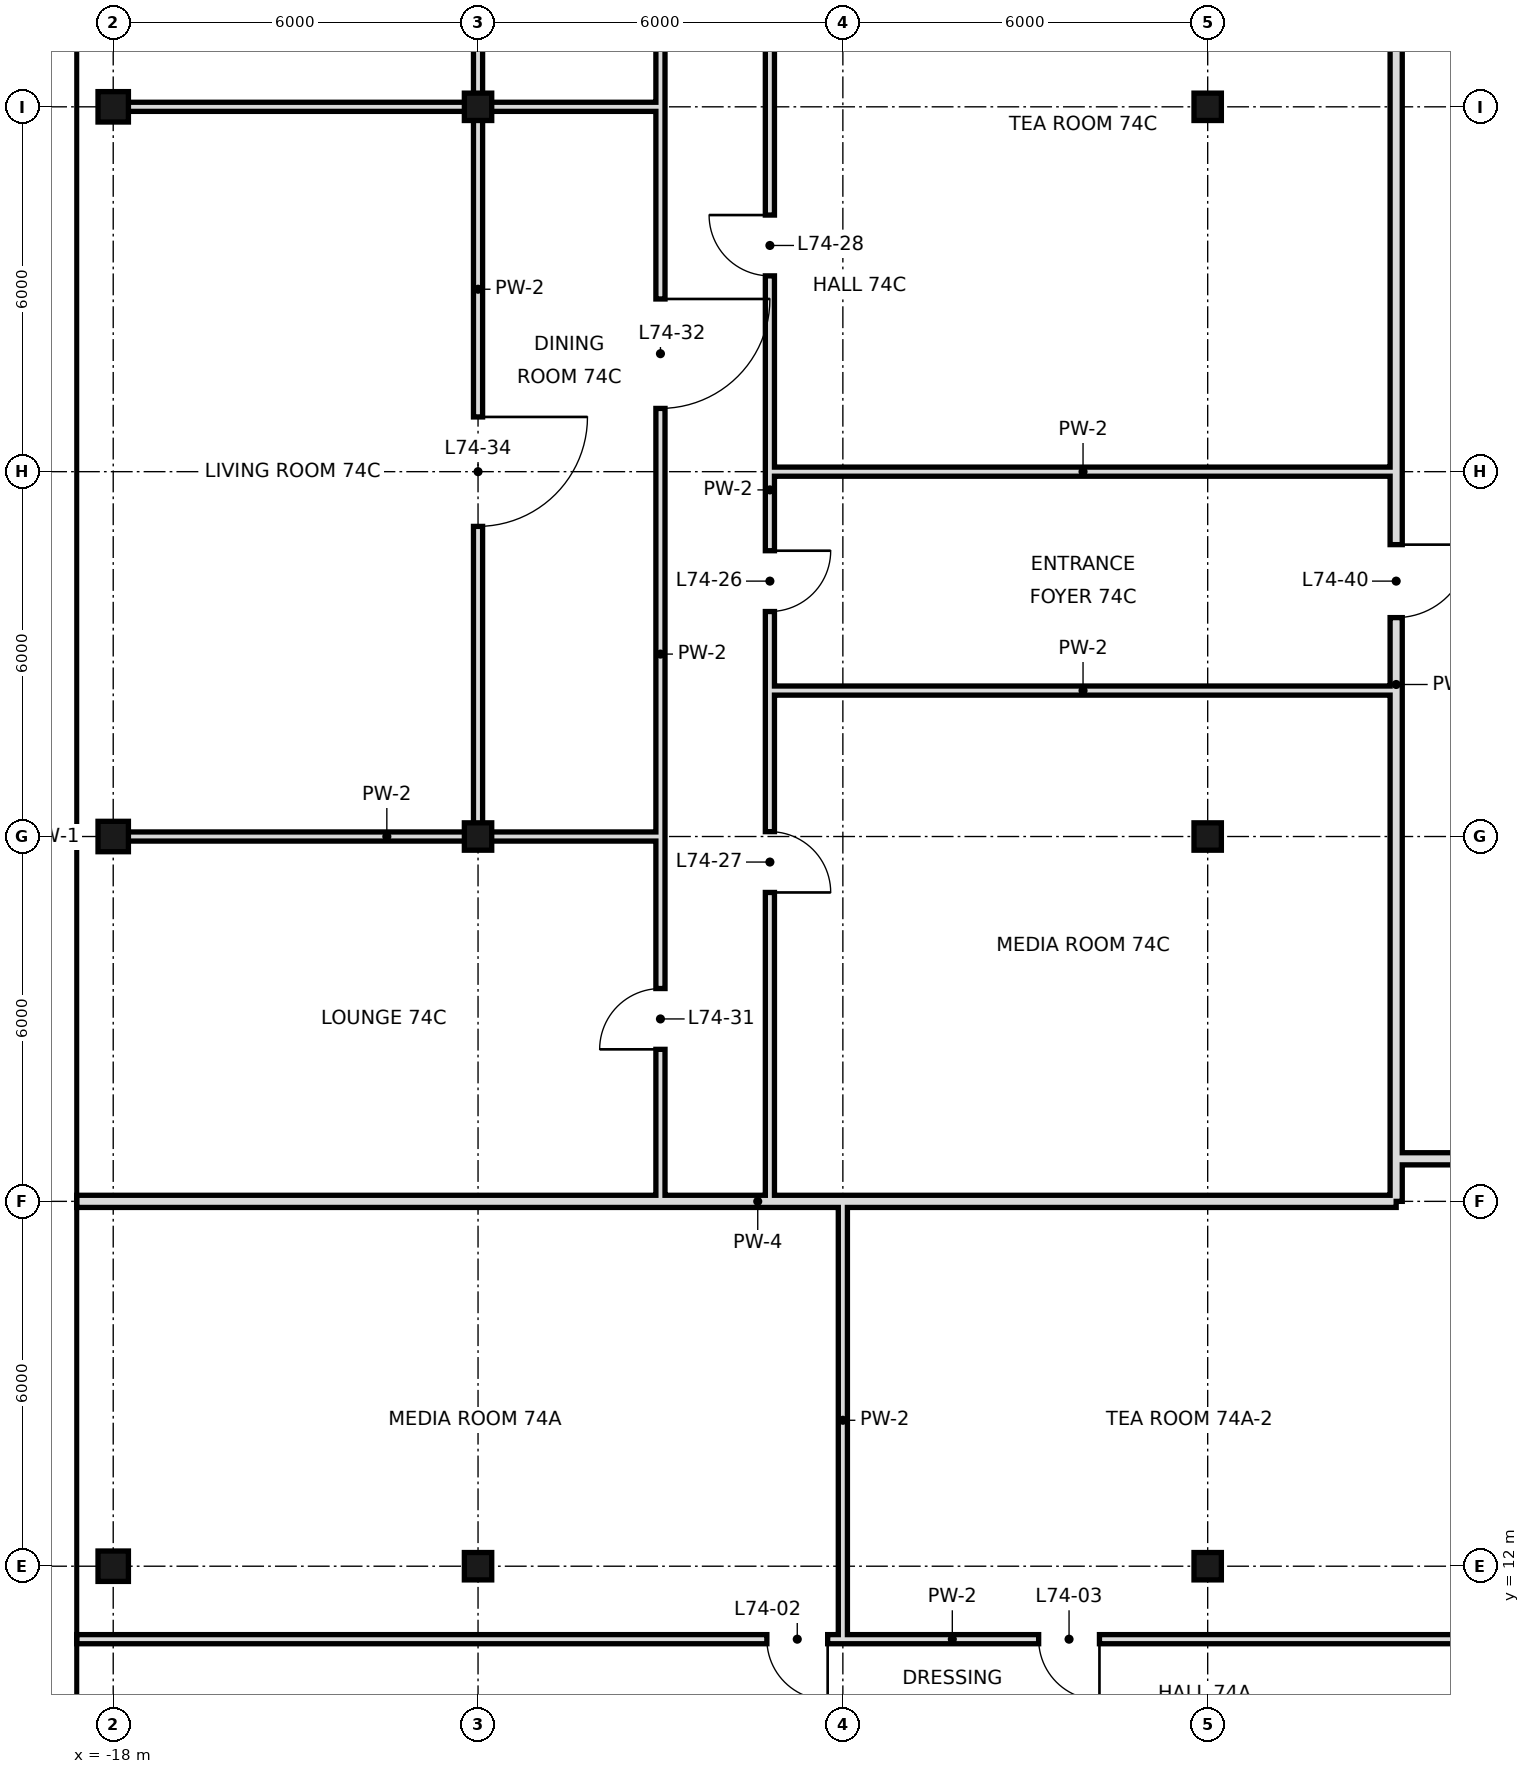
"""IFC4 building model, lengths in metres.
Left out: names, types, materials, properties, quantities, classifications, styles, units other than length and angle.
Written with IfcOpenShell. Run it as: python <this file> out.ifc"""

import sys

from ifc_helpers import new_model, si_unit, direction, frame, frame_2d, origin, origin_2d, place, context, subcontext, project, spatial, rectangle, hollow_rectangle, extrude, element, fill, save


model = new_model("IFC4")
c1 = context("Model", 3, precision=1e-05, world=origin(), true_north=direction((0.0, 1.0)))
c2 = subcontext(c1, "Body", "Model", "MODEL_VIEW")
j1 = project(units=[si_unit("LENGTHUNIT", "METRE"), si_unit("PLANEANGLEUNIT", "RADIAN")], contexts=[c1])
p1 = place(None, origin())
s1 = spatial("IfcSite", under=j1, at=p1, CompositionType="ELEMENT")
p2 = place(p1, origin())
s2 = spatial("IfcBuilding", under=s1, at=p2, CompositionType="ELEMENT")
p3 = place(p2, frame((0.0, 0.0, 312.4)))
s3 = spatial("IfcBuildingStorey", under=s2, at=p3, CompositionType="ELEMENT", Elevation=312.4)
for number, where, z_axis, x_axis in (
    (1, (-18.0, 12.0, 0.0), (0.0, 0.0, 1.0), (1.0, 0.0, 0.0)),
    (2, (-18.0, 24.0, 0.0), (0.0, 0.0, 1.0), (1.0, 0.0, 0.0)),
    (3, (-18.0, 36.0, 0.0), (0.0, 0.0, 1.0), (1.0, 0.0, 0.0)),
):
    element("IfcColumn", number, at=place(p3, frame(where, z_axis=z_axis, x_axis=x_axis)), inside=s3, PredefinedType="COLUMN", context=c2, shape_type="SweptSolid", body=[
        extrude(hollow_rectangle(XDim=0.5, YDim=0.5, WallThickness=0.025, at=origin_2d()), origin(), (0.0, 0.0, 1.0), 3.6),
    ])
for number, where, z_axis, x_axis in (
    (4, (-12.0, 12.0, 0.0), (0.0, 0.0, 1.0), (1.0, 0.0, 0.0)),
    (5, (-12.0, 24.0, 0.0), (0.0, 0.0, 1.0), (1.0, 0.0, 0.0)),
    (6, (-12.0, 36.0, 0.0), (0.0, 0.0, 1.0), (1.0, 0.0, 0.0)),
    (7, (0.0, 12.0, 0.0), (0.0, 0.0, 1.0), (1.0, 0.0, 0.0)),
    (8, (0.0, 24.0, 0.0), (0.0, 0.0, 1.0), (1.0, 0.0, 0.0)),
    (9, (0.0, 36.0, 0.0), (0.0, 0.0, 1.0), (1.0, 0.0, 0.0)),
):
    element("IfcColumn", number, at=place(p3, frame(where, z_axis=z_axis, x_axis=x_axis)), inside=s3, PredefinedType="COLUMN", context=c2, shape_type="SweptSolid", body=[
        extrude(hollow_rectangle(XDim=0.45, YDim=0.45, WallThickness=0.022, at=origin_2d()), origin(), (0.0, 0.0, 1.0), 3.6),
    ])
p4 = place(p3, frame((-12.0, 24.0, 0.0), z_axis=(0.0, 0.0, 1.0), x_axis=(0.0, 1.0, 0.0)))
e10 = element("IfcWall", 10, at=p4, inside=s3, PredefinedType="PARTITIONING", context=c2, shape_type="SweptSolid", body=[
    extrude(rectangle(XDim=12.0, YDim=0.15, at=frame_2d((6.0, 0.0))), origin(), (0.0, 0.0, 1.0), 2.72),
])
p5 = place(p4, frame((5.1, 0.0, 0.0)))
e11 = element("IfcOpeningElement", 11, at=p5, cuts=e10, PredefinedType="OPENING", context=c2, shape_type="SweptSolid", body=[
    extrude(rectangle(XDim=1.8, YDim=2.4, at=frame_2d((0.9, 1.2))), frame((0.0, 0.085, 0.0), z_axis=(0.0, -1.0, 0.0), x_axis=(1.0, 0.0, 0.0)), (0.0, 0.0, 1.0), 0.17),
])
p6 = place(p3, frame((-12.0, 36.0, 0.0), z_axis=(0.0, 0.0, 1.0), x_axis=(0.0, 1.0, 0.0)))
e12 = element("IfcWall", 12, at=p6, inside=s3, PredefinedType="PARTITIONING", context=c2, shape_type="SweptSolid", body=[
    extrude(rectangle(XDim=8.4, YDim=0.15, at=frame_2d((4.2, 0.0))), origin(), (0.0, 0.0, 1.0), 2.72),
])
p7 = place(p6, frame((6.75, 0.0, 0.0)))
e13 = element("IfcOpeningElement", 13, at=p7, cuts=e12, PredefinedType="OPENING", context=c2, shape_type="SweptSolid", body=[
    extrude(rectangle(XDim=0.9, YDim=2.4, at=frame_2d((0.45, 1.2))), frame((0.0, 0.085, 0.0), z_axis=(0.0, -1.0, 0.0), x_axis=(1.0, 0.0, 0.0)), (0.0, 0.0, 1.0), 0.17),
])
p8 = place(p3, frame((-6.0, 10.8, 0.0), z_axis=(0.0, 0.0, 1.0), x_axis=(0.0, 1.0, 0.0)))
e14 = element("IfcWall", 14, at=p8, inside=s3, PredefinedType="PARTITIONING", context=c2, shape_type="SweptSolid", body=[
    extrude(rectangle(XDim=7.2, YDim=0.15, at=frame_2d((3.6, 0.0))), origin(), (0.0, 0.0, 1.0), 3.42),
])
p9 = place(p3, frame((-7.2, 18.0, 0.0), z_axis=(0.0, 0.0, 1.0), x_axis=(0.0, 1.0, 0.0)))
e15 = element("IfcWall", 15, at=p9, inside=s3, PredefinedType="PARTITIONING", context=c2, shape_type="SweptSolid", body=[
    extrude(rectangle(XDim=23.4, YDim=0.15, at=frame_2d((11.7, 0.0))), origin(), (0.0, 0.0, 1.0), 3.42),
])
p10 = place(p9, frame((9.7, 0.0, 0.0)))
e16 = element("IfcOpeningElement", 16, at=p10, cuts=e15, PredefinedType="OPENING", context=c2, shape_type="SweptSolid", body=[
    extrude(rectangle(XDim=1.0, YDim=2.4, at=frame_2d((0.5, 1.2))), frame((0.0, 0.085, 0.0), z_axis=(0.0, -1.0, 0.0), x_axis=(1.0, 0.0, 0.0)), (0.0, 0.0, 1.0), 0.17),
])
p11 = place(p9, frame((5.08, 0.0, 0.0)))
e17 = element("IfcOpeningElement", 17, at=p11, cuts=e15, PredefinedType="OPENING", context=c2, shape_type="SweptSolid", body=[
    extrude(rectangle(XDim=1.0, YDim=2.4, at=frame_2d((0.5, 1.2))), frame((0.0, 0.085, 0.0), z_axis=(0.0, -1.0, 0.0), x_axis=(1.0, 0.0, 0.0)), (0.0, 0.0, 1.0), 0.17),
])
p12 = place(p9, frame((15.22, 0.0, 0.0)))
e18 = element("IfcOpeningElement", 18, at=p12, cuts=e15, PredefinedType="OPENING", context=c2, shape_type="SweptSolid", body=[
    extrude(rectangle(XDim=1.0, YDim=2.4, at=frame_2d((0.5, 1.2))), frame((0.0, 0.085, 0.0), z_axis=(0.0, -1.0, 0.0), x_axis=(1.0, 0.0, 0.0)), (0.0, 0.0, 1.0), 0.17),
])
p13 = place(p3, frame((-9.0, 18.0, 0.0), z_axis=(0.0, 0.0, 1.0), x_axis=(0.0, 1.0, 0.0)))
e19 = element("IfcWall", 19, at=p13, inside=s3, PredefinedType="PARTITIONING", context=c2, shape_type="SweptSolid", body=[
    extrude(rectangle(XDim=18.0, YDim=0.15, at=frame_2d((9.0, 0.0))), origin(), (0.0, 0.0, 1.0), 3.42),
])
p14 = place(p13, frame((2.5, 0.0, 0.0)))
e20 = element("IfcOpeningElement", 20, at=p14, cuts=e19, PredefinedType="OPENING", context=c2, shape_type="SweptSolid", body=[
    extrude(rectangle(XDim=1.0, YDim=2.4, at=frame_2d((0.5, 1.2))), frame((0.0, 0.085, 0.0), z_axis=(0.0, -1.0, 0.0), x_axis=(1.0, 0.0, 0.0)), (0.0, 0.0, 1.0), 0.17),
])
p15 = place(p13, frame((13.04, 0.0, 0.0)))
e21 = element("IfcOpeningElement", 21, at=p15, cuts=e19, PredefinedType="OPENING", context=c2, shape_type="SweptSolid", body=[
    extrude(rectangle(XDim=1.8, YDim=2.4, at=frame_2d((0.9, 1.2))), frame((0.0, 0.085, 0.0), z_axis=(0.0, -1.0, 0.0), x_axis=(1.0, 0.0, 0.0)), (0.0, 0.0, 1.0), 0.17),
])
p16 = place(p3, frame((-9.0, 36.0, 0.0), z_axis=(0.0, 0.0, 1.0), x_axis=(0.0, 1.0, 0.0)))
e22 = element("IfcWall", 22, at=p16, inside=s3, PredefinedType="PARTITIONING", context=c2, shape_type="SweptSolid", body=[
    extrude(rectangle(XDim=8.4, YDim=0.15, at=frame_2d((4.2, 0.0))), origin(), (0.0, 0.0, 1.0), 3.42),
])
p17 = place(p3, frame((3.1, 18.7, 0.0), z_axis=(0.0, 0.0, 1.0), x_axis=(0.0, 1.0, 0.0)))
e23 = element("IfcWall", 23, at=p17, inside=s3, PredefinedType="SOLIDWALL", context=c2, shape_type="SweptSolid", body=[
    extrude(rectangle(XDim=22.7, YDim=0.2, at=frame_2d((11.35, 0.0))), origin(), (0.0, 0.0, 1.0), 2.97),
])
p18 = place(p17, frame((8.9, 0.0, 0.0)))
e24 = element("IfcOpeningElement", 24, at=p18, cuts=e23, PredefinedType="OPENING", context=c2, shape_type="SweptSolid", body=[
    extrude(rectangle(XDim=1.2, YDim=2.4, at=frame_2d((0.6, 1.2))), frame((0.0, 0.11, 0.0), z_axis=(0.0, -1.0, 0.0), x_axis=(1.0, 0.0, 0.0)), (0.0, 0.0, 1.0), 0.22),
])
p19 = place(p3, frame((3.1, 18.0, 0.0), z_axis=(0.0, 0.0, 1.0), x_axis=(0.0, 1.0, 0.0)))
e25 = element("IfcWall", 25, at=p19, inside=s3, PredefinedType="SOLIDWALL", context=c2, shape_type="SweptSolid", body=[
    extrude(rectangle(XDim=0.7, YDim=0.2, at=frame_2d((0.35, 0.0))), origin(), (0.0, 0.0, 1.0), 2.97),
])
p20 = place(p3, frame((-18.6, 10.8, 0.0), z_axis=(0.0, 0.0, 1.0), x_axis=(1.0, 0.0, 0.0)))
e26 = element("IfcWall", 26, at=p20, inside=s3, PredefinedType="PARTITIONING", context=c2, shape_type="SweptSolid", body=[
    extrude(rectangle(XDim=28.8, YDim=0.15, at=frame_2d((14.4, 0.0))), origin(), (0.0, 0.0, 1.0), 3.42),
])
p21 = place(p20, frame((25.9, 0.0, 0.0)))
e27 = element("IfcOpeningElement", 27, at=p21, cuts=e26, PredefinedType="OPENING", context=c2, shape_type="SweptSolid", body=[
    extrude(rectangle(XDim=1.0, YDim=2.4, at=frame_2d((0.5, 1.2))), frame((0.0, 0.085, 0.0), z_axis=(0.0, -1.0, 0.0), x_axis=(1.0, 0.0, 0.0)), (0.0, 0.0, 1.0), 0.17),
])
p22 = place(p20, frame((11.35, 0.0, 0.0)))
e28 = element("IfcOpeningElement", 28, at=p22, cuts=e26, PredefinedType="OPENING", context=c2, shape_type="SweptSolid", body=[
    extrude(rectangle(XDim=1.0, YDim=2.4, at=frame_2d((0.5, 1.2))), frame((0.0, 0.085, 0.0), z_axis=(0.0, -1.0, 0.0), x_axis=(1.0, 0.0, 0.0)), (0.0, 0.0, 1.0), 0.17),
])
p23 = place(p20, frame((15.82, 0.0, 0.0)))
e29 = element("IfcOpeningElement", 29, at=p23, cuts=e26, PredefinedType="OPENING", context=c2, shape_type="SweptSolid", body=[
    extrude(rectangle(XDim=1.0, YDim=2.4, at=frame_2d((0.5, 1.2))), frame((0.0, 0.085, 0.0), z_axis=(0.0, -1.0, 0.0), x_axis=(1.0, 0.0, 0.0)), (0.0, 0.0, 1.0), 0.17),
])
p24 = place(p3, frame((-18.6, 18.0, 0.0), z_axis=(0.0, 0.0, 1.0), x_axis=(1.0, 0.0, 0.0)))
e30 = element("IfcWall", 30, at=p24, inside=s3, PredefinedType="SOLIDWALL", context=c2, shape_type="SweptSolid", body=[
    extrude(rectangle(XDim=21.7, YDim=0.2, at=frame_2d((10.85, 0.0))), origin(), (0.0, 0.0, 1.0), 2.72),
])
p25 = place(p3, frame((3.1, 18.7, 0.0), z_axis=(0.0, 0.0, 1.0), x_axis=(1.0, 0.0, 0.0)))
e31 = element("IfcWall", 31, at=p25, inside=s3, PredefinedType="SOLIDWALL", context=c2, shape_type="SweptSolid", body=[
    extrude(rectangle(XDim=7.1, YDim=0.2, at=frame_2d((3.55, 0.0))), origin(), (0.0, 0.0, 1.0), 2.72),
])
p26 = place(p25, frame((3.48, 0.0, 0.0)))
e32 = element("IfcOpeningElement", 32, at=p26, cuts=e31, PredefinedType="OPENING", context=c2, shape_type="SweptSolid", body=[
    extrude(rectangle(XDim=1.2, YDim=2.4, at=frame_2d((0.6, 1.2))), frame((0.0, 0.11, 0.0), z_axis=(0.0, -1.0, 0.0), x_axis=(1.0, 0.0, 0.0)), (0.0, 0.0, 1.0), 0.22),
])
p27 = place(p3, frame((-18.0, 24.0, 0.0), z_axis=(0.0, 0.0, 1.0), x_axis=(1.0, 0.0, 0.0)))
e33 = element("IfcWall", 33, at=p27, inside=s3, PredefinedType="PARTITIONING", context=c2, shape_type="SweptSolid", body=[
    extrude(rectangle(XDim=9.0, YDim=0.15, at=frame_2d((4.5, 0.0))), origin(), (0.0, 0.0, 1.0), 2.72),
])
p28 = place(p3, frame((-7.2, 26.4, 0.0), z_axis=(0.0, 0.0, 1.0), x_axis=(1.0, 0.0, 0.0)))
e34 = element("IfcWall", 34, at=p28, inside=s3, PredefinedType="PARTITIONING", context=c2, shape_type="SweptSolid", body=[
    extrude(rectangle(XDim=10.3, YDim=0.15, at=frame_2d((5.15, 0.0))), origin(), (0.0, 0.0, 1.0), 3.42),
])
p29 = place(p3, frame((-7.2, 30.0, 0.0), z_axis=(0.0, 0.0, 1.0), x_axis=(1.0, 0.0, 0.0)))
e35 = element("IfcWall", 35, at=p29, inside=s3, PredefinedType="PARTITIONING", context=c2, shape_type="SweptSolid", body=[
    extrude(rectangle(XDim=10.3, YDim=0.15, at=frame_2d((5.15, 0.0))), origin(), (0.0, 0.0, 1.0), 2.72),
])
p30 = place(p3, frame((-18.0, 36.0, 0.0), z_axis=(0.0, 0.0, 1.0), x_axis=(1.0, 0.0, 0.0)))
e36 = element("IfcWall", 36, at=p30, inside=s3, PredefinedType="PARTITIONING", context=c2, shape_type="SweptSolid", body=[
    extrude(rectangle(XDim=6.0, YDim=0.15, at=frame_2d((3.0, 0.0))), origin(), (0.0, 0.0, 1.0), 2.97),
])
p31 = place(p3, frame((-12.0, 36.0, 0.0), z_axis=(0.0, 0.0, 1.0), x_axis=(1.0, 0.0, 0.0)))
e37 = element("IfcWall", 37, at=p31, inside=s3, PredefinedType="PARTITIONING", context=c2, shape_type="SweptSolid", body=[
    extrude(rectangle(XDim=3.0, YDim=0.15, at=frame_2d((1.5, 0.0))), origin(), (0.0, 0.0, 1.0), 2.72),
])
p32 = place(p22, origin())
e38 = element("IfcDoor", 38, at=p32, inside=s3, OperationType="SINGLE_SWING_RIGHT", PredefinedType="DOOR", context=c2, shape_type="SweptSolid", body=[
    extrude(rectangle(XDim=1.0, YDim=2.4, at=frame_2d((0.5, 1.2))), frame((0.0, 0.025, 0.0), z_axis=(0.0, -1.0, 0.0), x_axis=(1.0, 0.0, 0.0)), (0.0, 0.0, 1.0), 0.05),
])
fill(e28, e38)
p33 = place(p23, origin())
e39 = element("IfcDoor", 39, at=p33, inside=s3, OperationType="SINGLE_SWING_RIGHT", PredefinedType="DOOR", context=c2, shape_type="SweptSolid", body=[
    extrude(rectangle(XDim=1.0, YDim=2.4, at=frame_2d((0.5, 1.2))), frame((0.0, 0.025, 0.0), z_axis=(0.0, -1.0, 0.0), x_axis=(1.0, 0.0, 0.0)), (0.0, 0.0, 1.0), 0.05),
])
fill(e29, e39)
p34 = place(p10, origin())
e40 = element("IfcDoor", 40, at=p34, inside=s3, OperationType="SINGLE_SWING_RIGHT", PredefinedType="DOOR", context=c2, shape_type="SweptSolid", body=[
    extrude(rectangle(XDim=1.0, YDim=2.4, at=frame_2d((0.5, 1.2))), frame((0.0, 0.025, 0.0), z_axis=(0.0, -1.0, 0.0), x_axis=(1.0, 0.0, 0.0)), (0.0, 0.0, 1.0), 0.05),
])
fill(e16, e40)
p35 = place(p11, frame((1.0, 0.0, 0.0), z_axis=(0.0, 0.0, 1.0), x_axis=(-1.0, 0.0, 0.0)))
e41 = element("IfcDoor", 41, at=p35, inside=s3, OperationType="SINGLE_SWING_RIGHT", PredefinedType="DOOR", context=c2, shape_type="SweptSolid", body=[
    extrude(rectangle(XDim=1.0, YDim=2.4, at=frame_2d((0.5, 1.2))), frame((0.0, 0.025, 0.0), z_axis=(0.0, -1.0, 0.0), x_axis=(1.0, 0.0, 0.0)), (0.0, 0.0, 1.0), 0.05),
])
fill(e17, e41)
p36 = place(p12, frame((1.0, 0.0, 0.0), z_axis=(0.0, 0.0, 1.0), x_axis=(-1.0, 0.0, 0.0)))
e42 = element("IfcDoor", 42, at=p36, inside=s3, OperationType="SINGLE_SWING_LEFT", PredefinedType="DOOR", context=c2, shape_type="SweptSolid", body=[
    extrude(rectangle(XDim=1.0, YDim=2.4, at=frame_2d((0.5, 1.2))), frame((0.0, 0.025, 0.0), z_axis=(0.0, -1.0, 0.0), x_axis=(1.0, 0.0, 0.0)), (0.0, 0.0, 1.0), 0.05),
])
fill(e18, e42)
p37 = place(p14, origin())
e43 = element("IfcDoor", 43, at=p37, inside=s3, OperationType="SINGLE_SWING_LEFT", PredefinedType="DOOR", context=c2, shape_type="SweptSolid", body=[
    extrude(rectangle(XDim=1.0, YDim=2.4, at=frame_2d((0.5, 1.2))), frame((0.0, 0.025, 0.0), z_axis=(0.0, -1.0, 0.0), x_axis=(1.0, 0.0, 0.0)), (0.0, 0.0, 1.0), 0.05),
])
fill(e20, e43)
p38 = place(p15, origin())
e44 = element("IfcDoor", 44, at=p38, inside=s3, OperationType="SINGLE_SWING_RIGHT", PredefinedType="DOOR", context=c2, shape_type="SweptSolid", body=[
    extrude(rectangle(XDim=1.8, YDim=2.4, at=frame_2d((0.9, 1.2))), frame((0.0, 0.025, 0.0), z_axis=(0.0, -1.0, 0.0), x_axis=(1.0, 0.0, 0.0)), (0.0, 0.0, 1.0), 0.05),
])
fill(e21, e44)
p39 = place(p5, origin())
e45 = element("IfcDoor", 45, at=p39, inside=s3, OperationType="SINGLE_SWING_RIGHT", PredefinedType="DOOR", context=c2, shape_type="SweptSolid", body=[
    extrude(rectangle(XDim=1.8, YDim=2.4, at=frame_2d((0.9, 1.2))), frame((0.0, 0.025, 0.0), z_axis=(0.0, -1.0, 0.0), x_axis=(1.0, 0.0, 0.0)), (0.0, 0.0, 1.0), 0.05),
])
fill(e11, e45)
p40 = place(p18, origin())
e46 = element("IfcDoor", 46, at=p40, inside=s3, OperationType="SINGLE_SWING_RIGHT", PredefinedType="DOOR", context=c2, shape_type="SweptSolid", body=[
    extrude(rectangle(XDim=1.2, YDim=2.4, at=frame_2d((0.6, 1.2))), frame((0.0, 0.025, 0.0), z_axis=(0.0, -1.0, 0.0), x_axis=(1.0, 0.0, 0.0)), (0.0, 0.0, 1.0), 0.05),
])
fill(e24, e46)
save(model, sys.argv[1])
